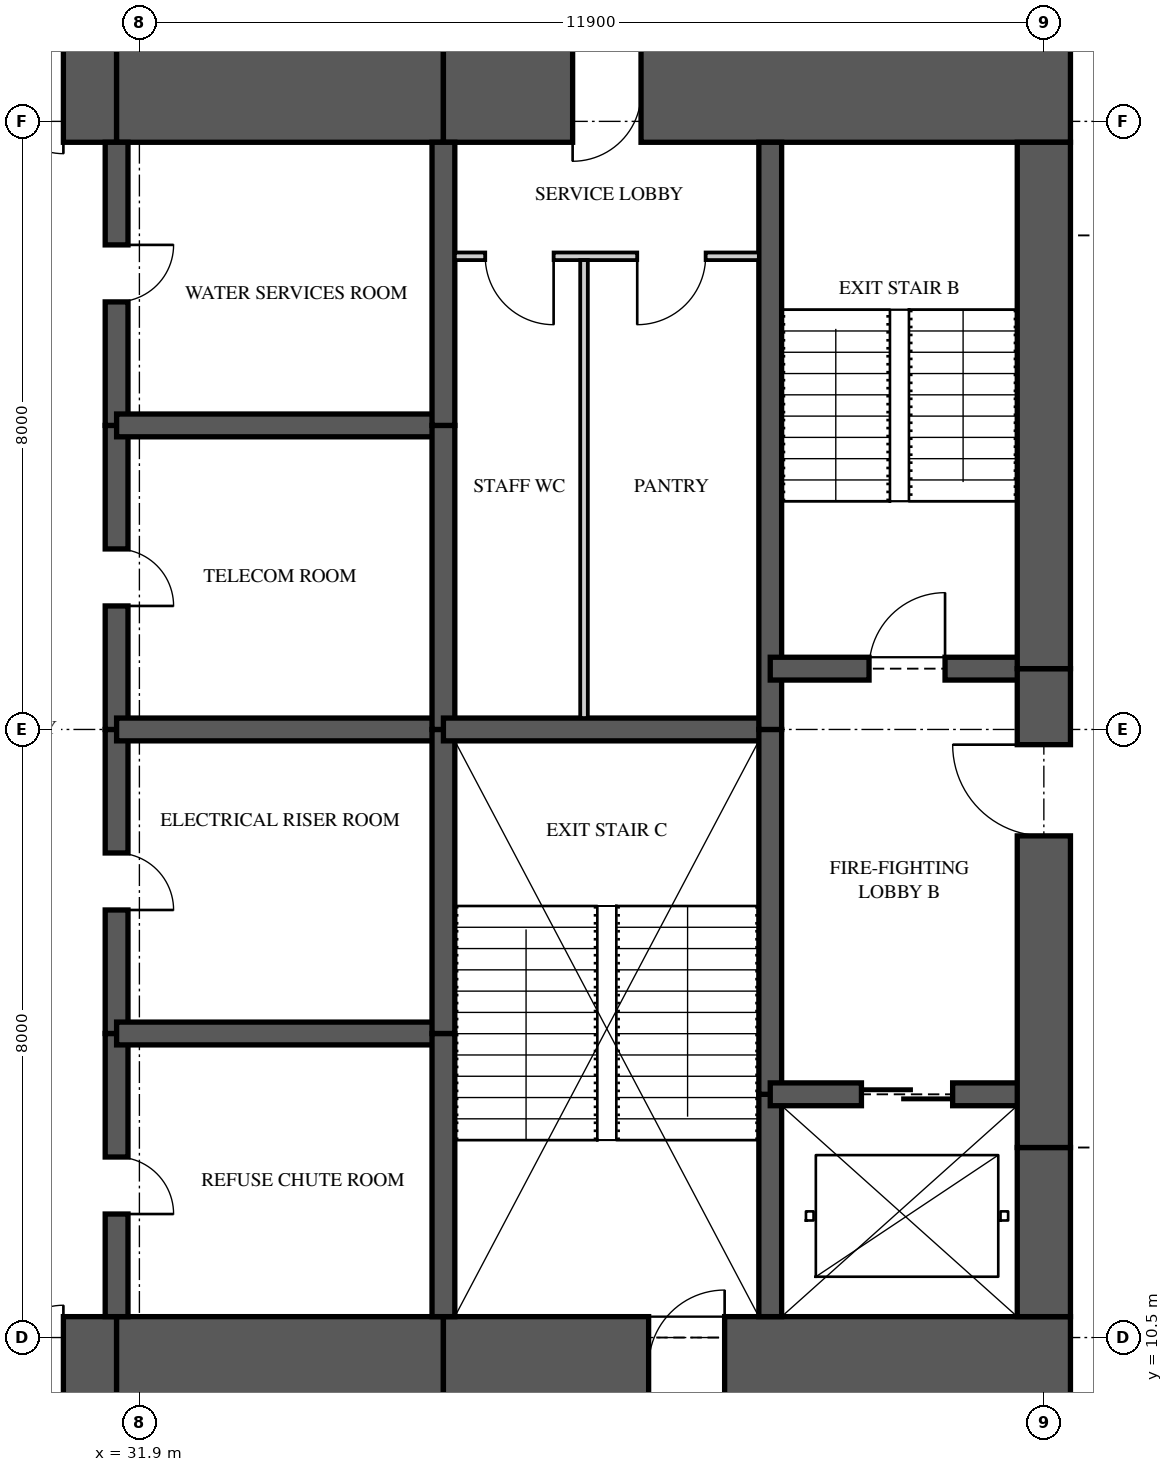
"""IFC4 building model, lengths in metres.
Left out: names, types, materials, properties, quantities, classifications, styles, units other than length and angle.
Written with IfcOpenShell. Run it as: python <this file> out.ifc"""

import sys

from ifc_helpers import new_model, si_unit, direction, frame, frame_2d, origin, place, context, subcontext, project, spatial, rectangle, extrude, element, fill, save


model = new_model("IFC4")
c1 = context("Model", 3, precision=1e-05, world=origin(), true_north=direction((0.0, 1.0)))
c2 = subcontext(c1, "Body", "Model", "MODEL_VIEW")
j1 = project(units=[si_unit("LENGTHUNIT", "METRE"), si_unit("PLANEANGLEUNIT", "RADIAN")], contexts=[c1])
p1 = place(None, origin())
s1 = spatial("IfcSite", under=j1, at=p1, CompositionType="ELEMENT")
p2 = place(p1, origin())
s2 = spatial("IfcBuilding", under=s1, at=p2, CompositionType="ELEMENT")
p3 = place(p2, frame((0.0, 0.0, 194.55)))
s3 = spatial("IfcBuildingStorey", under=s2, at=p3, CompositionType="ELEMENT", Elevation=194.55)
p4 = place(p3, frame((26.0, 10.125, 0.0), z_axis=(0.0, 0.0, 1.0), x_axis=(1.0, 0.0, 0.0)))
e1 = element("IfcWall", 1, at=p4, inside=s3, PredefinedType="SHEAR", context=c2, shape_type="SweptSolid", body=[
    extrude(rectangle(XDim=5.6, YDim=1.3, at=frame_2d((2.8, 0.0))), origin(), (0.0, 0.0, 1.0), 3.35),
])
p5 = place(p4, frame((3.3, 0.0, 0.0)))
e2 = element("IfcOpeningElement", 2, at=p5, cuts=e1, PredefinedType="OPENING", context=c2, shape_type="SweptSolid", body=[
    extrude(rectangle(XDim=1.6, YDim=2.1, at=frame_2d((0.8, 1.05))), frame((0.0, 0.66, 0.0), z_axis=(0.0, -1.0, 0.0), x_axis=(1.0, 0.0, 0.0)), (0.0, 0.0, 1.0), 1.32),
])
p6 = place(p3, frame((31.6, 10.125, 0.0), z_axis=(0.0, 0.0, 1.0), x_axis=(1.0, 0.0, 0.0)))
e3 = element("IfcWall", 3, at=p6, inside=s3, PredefinedType="SHEAR", context=c2, shape_type="SweptSolid", body=[
    extrude(rectangle(XDim=4.3, YDim=1.3, at=frame_2d((2.15, 0.0))), origin(), (0.0, 0.0, 1.0), 3.35),
])
p7 = place(p3, frame((35.9, 10.125, 0.0), z_axis=(0.0, 0.0, 1.0), x_axis=(1.0, 0.0, 0.0)))
e4 = element("IfcWall", 4, at=p7, inside=s3, PredefinedType="SHEAR", context=c2, shape_type="SweptSolid", body=[
    extrude(rectangle(XDim=8.25, YDim=1.3, at=frame_2d((4.125, 0.0))), origin(), (0.0, 0.0, 1.0), 3.35),
])
p8 = place(p7, frame((2.7, 0.0, 0.0)))
e5 = element("IfcOpeningElement", 5, at=p8, cuts=e4, PredefinedType="OPENING", context=c2, shape_type="SweptSolid", body=[
    extrude(rectangle(XDim=1.0, YDim=2.1, at=frame_2d((0.5, 1.05))), frame((0.0, 0.66, 0.0), z_axis=(0.0, -1.0, 0.0), x_axis=(1.0, 0.0, 0.0)), (0.0, 0.0, 1.0), 1.32),
])
p9 = place(p3, frame((44.15, 26.875, 0.0), z_axis=(0.0, 0.0, 1.0), x_axis=(-1.0, 0.0, 0.0)))
e6 = element("IfcWall", 6, at=p9, inside=s3, PredefinedType="SHEAR", context=c2, shape_type="SweptSolid", body=[
    extrude(rectangle(XDim=8.25, YDim=1.3, at=frame_2d((4.125, 0.0))), origin(), (0.0, 0.0, 1.0), 3.35),
])
p10 = place(p9, frame((5.65, 0.0, 0.0)))
e7 = element("IfcOpeningElement", 7, at=p10, cuts=e6, PredefinedType="OPENING", context=c2, shape_type="SweptSolid", body=[
    extrude(rectangle(XDim=0.9, YDim=2.1, at=frame_2d((0.45, 1.05))), frame((0.0, 0.66, 0.0), z_axis=(0.0, -1.0, 0.0), x_axis=(1.0, 0.0, 0.0)), (0.0, 0.0, 1.0), 1.32),
])
p11 = place(p3, frame((35.9, 26.875, 0.0), z_axis=(0.0, 0.0, 1.0), x_axis=(-1.0, 0.0, 0.0)))
e8 = element("IfcWall", 8, at=p11, inside=s3, PredefinedType="SHEAR", context=c2, shape_type="SweptSolid", body=[
    extrude(rectangle(XDim=4.3, YDim=1.3, at=frame_2d((2.15, 0.0))), origin(), (0.0, 0.0, 1.0), 3.35),
])
p12 = place(p3, frame((31.6, 26.875, 0.0), z_axis=(0.0, 0.0, 1.0), x_axis=(-1.0, 0.0, 0.0)))
e9 = element("IfcWall", 9, at=p12, inside=s3, PredefinedType="SHEAR", context=c2, shape_type="SweptSolid", body=[
    extrude(rectangle(XDim=5.6, YDim=1.3, at=frame_2d((2.8, 0.0))), origin(), (0.0, 0.0, 1.0), 3.35),
])
p13 = place(p12, frame((0.7, 0.0, 0.0)))
e10 = element("IfcOpeningElement", 10, at=p13, cuts=e9, PredefinedType="OPENING", context=c2, shape_type="SweptSolid", body=[
    extrude(rectangle(XDim=1.6, YDim=2.1, at=frame_2d((0.8, 1.05))), frame((0.0, 0.66, 0.0), z_axis=(0.0, -1.0, 0.0), x_axis=(1.0, 0.0, 0.0)), (0.0, 0.0, 1.0), 1.32),
])
p14 = place(p3, frame((43.8, 10.775, 0.0), z_axis=(0.0, 0.0, 1.0), x_axis=(0.0, 1.0, 0.0)))
e11 = element("IfcWall", 11, at=p14, inside=s3, PredefinedType="SHEAR", context=c2, shape_type="SweptSolid", body=[
    extrude(rectangle(XDim=2.225, YDim=0.7, at=frame_2d((1.113, 0.0))), origin(), (0.0, 0.0, 1.0), 3.35),
])
p15 = place(p3, frame((43.8, 13.0, 0.0), z_axis=(0.0, 0.0, 1.0), x_axis=(0.0, 1.0, 0.0)))
e12 = element("IfcWall", 12, at=p15, inside=s3, PredefinedType="SHEAR", context=c2, shape_type="SweptSolid", body=[
    extrude(rectangle(XDim=6.3, YDim=0.7, at=frame_2d((3.15, 0.0))), origin(), (0.0, 0.0, 1.0), 3.35),
])
p16 = place(p15, frame((4.1, 0.0, 0.0)))
e13 = element("IfcOpeningElement", 13, at=p16, cuts=e12, PredefinedType="OPENING", context=c2, shape_type="SweptSolid", body=[
    extrude(rectangle(XDim=1.2, YDim=2.2, at=frame_2d((0.6, 1.1))), frame((0.0, 0.36, 0.0), z_axis=(0.0, -1.0, 0.0), x_axis=(1.0, 0.0, 0.0)), (0.0, 0.0, 1.0), 0.72),
])
p17 = place(p3, frame((43.8, 19.3, 0.0), z_axis=(0.0, 0.0, 1.0), x_axis=(0.0, 1.0, 0.0)))
e14 = element("IfcWall", 14, at=p17, inside=s3, PredefinedType="SHEAR", context=c2, shape_type="SweptSolid", body=[
    extrude(rectangle(XDim=6.925, YDim=0.7, at=frame_2d((3.462, 0.0))), origin(), (0.0, 0.0, 1.0), 3.35),
])
p18 = place(p3, frame((31.6, 10.775, 0.0), z_axis=(0.0, 0.0, 1.0), x_axis=(0.0, 1.0, 0.0)))
e15 = element("IfcWall", 15, at=p18, inside=s3, PredefinedType="SHEAR", context=c2, shape_type="SweptSolid", body=[
    extrude(rectangle(XDim=3.725, YDim=0.3, at=frame_2d((1.863, 0.0))), origin(), (0.0, 0.0, 1.0), 3.35),
])
p19 = place(p18, frame((1.35, 0.0, 0.0)))
e16 = element("IfcOpeningElement", 16, at=p19, cuts=e15, PredefinedType="OPENING", context=c2, shape_type="SweptSolid", body=[
    extrude(rectangle(XDim=0.75, YDim=2.1, at=frame_2d((0.375, 1.05))), frame((0.0, 0.16, 0.0), z_axis=(0.0, -1.0, 0.0), x_axis=(1.0, 0.0, 0.0)), (0.0, 0.0, 1.0), 0.32),
])
p20 = place(p3, frame((31.6, 14.5, 0.0), z_axis=(0.0, 0.0, 1.0), x_axis=(0.0, 1.0, 0.0)))
e17 = element("IfcWall", 17, at=p20, inside=s3, PredefinedType="SHEAR", context=c2, shape_type="SweptSolid", body=[
    extrude(rectangle(XDim=4.0, YDim=0.3, at=frame_2d((2.0, 0.0))), origin(), (0.0, 0.0, 1.0), 3.35),
])
p21 = place(p20, frame((1.625, 0.0, 0.0)))
e18 = element("IfcOpeningElement", 18, at=p21, cuts=e17, PredefinedType="OPENING", context=c2, shape_type="SweptSolid", body=[
    extrude(rectangle(XDim=0.75, YDim=2.1, at=frame_2d((0.375, 1.05))), frame((0.0, 0.16, 0.0), z_axis=(0.0, -1.0, 0.0), x_axis=(1.0, 0.0, 0.0)), (0.0, 0.0, 1.0), 0.32),
])
p22 = place(p3, frame((31.6, 18.5, 0.0), z_axis=(0.0, 0.0, 1.0), x_axis=(0.0, 1.0, 0.0)))
e19 = element("IfcWall", 19, at=p22, inside=s3, PredefinedType="SHEAR", context=c2, shape_type="SweptSolid", body=[
    extrude(rectangle(XDim=4.0, YDim=0.3, at=frame_2d((2.0, 0.0))), origin(), (0.0, 0.0, 1.0), 3.35),
])
p23 = place(p22, frame((1.625, 0.0, 0.0)))
e20 = element("IfcOpeningElement", 20, at=p23, cuts=e19, PredefinedType="OPENING", context=c2, shape_type="SweptSolid", body=[
    extrude(rectangle(XDim=0.75, YDim=2.1, at=frame_2d((0.375, 1.05))), frame((0.0, 0.16, 0.0), z_axis=(0.0, -1.0, 0.0), x_axis=(1.0, 0.0, 0.0)), (0.0, 0.0, 1.0), 0.32),
])
p24 = place(p3, frame((31.6, 22.5, 0.0), z_axis=(0.0, 0.0, 1.0), x_axis=(0.0, 1.0, 0.0)))
e21 = element("IfcWall", 21, at=p24, inside=s3, PredefinedType="SHEAR", context=c2, shape_type="SweptSolid", body=[
    extrude(rectangle(XDim=3.725, YDim=0.3, at=frame_2d((1.863, 0.0))), origin(), (0.0, 0.0, 1.0), 3.35),
])
p25 = place(p24, frame((1.625, 0.0, 0.0)))
e22 = element("IfcOpeningElement", 22, at=p25, cuts=e21, PredefinedType="OPENING", context=c2, shape_type="SweptSolid", body=[
    extrude(rectangle(XDim=0.75, YDim=2.1, at=frame_2d((0.375, 1.05))), frame((0.0, 0.16, 0.0), z_axis=(0.0, -1.0, 0.0), x_axis=(1.0, 0.0, 0.0)), (0.0, 0.0, 1.0), 0.32),
])
p26 = place(p3, frame((35.9, 10.775, 0.0), z_axis=(0.0, 0.0, 1.0), x_axis=(0.0, 1.0, 0.0)))
e23 = element("IfcWall", 23, at=p26, inside=s3, PredefinedType="SHEAR", context=c2, shape_type="SweptSolid", body=[
    extrude(rectangle(XDim=3.725, YDim=0.3, at=frame_2d((1.863, 0.0))), origin(), (0.0, 0.0, 1.0), 3.35),
])
for number, where, z_axis, x_axis in (
    (24, (35.9, 14.5, 0.0), (0.0, 0.0, 1.0), (0.0, 1.0, 0.0)),
    (25, (35.9, 18.5, 0.0), (0.0, 0.0, 1.0), (0.0, 1.0, 0.0)),
):
    element("IfcWall", number, at=place(p3, frame(where, z_axis=z_axis, x_axis=x_axis)), inside=s3, PredefinedType="SHEAR", context=c2, shape_type="SweptSolid", body=[
        extrude(rectangle(XDim=4.0, YDim=0.3, at=frame_2d((2.0, 0.0))), origin(), (0.0, 0.0, 1.0), 3.35),
    ])
p27 = place(p3, frame((35.9, 22.5, 0.0), z_axis=(0.0, 0.0, 1.0), x_axis=(0.0, 1.0, 0.0)))
e26 = element("IfcWall", 26, at=p27, inside=s3, PredefinedType="SHEAR", context=c2, shape_type="SweptSolid", body=[
    extrude(rectangle(XDim=3.725, YDim=0.3, at=frame_2d((1.863, 0.0))), origin(), (0.0, 0.0, 1.0), 3.35),
])
p28 = place(p3, frame((40.2, 10.775, 0.0), z_axis=(0.0, 0.0, 1.0), x_axis=(0.0, 1.0, 0.0)))
e27 = element("IfcWall", 27, at=p28, inside=s3, PredefinedType="SHEAR", context=c2, shape_type="SweptSolid", body=[
    extrude(rectangle(XDim=2.925, YDim=0.3, at=frame_2d((1.462, 0.0))), origin(), (0.0, 0.0, 1.0), 3.35),
])
p29 = place(p3, frame((40.2, 13.7, 0.0), z_axis=(0.0, 0.0, 1.0), x_axis=(0.0, 1.0, 0.0)))
e28 = element("IfcWall", 28, at=p29, inside=s3, PredefinedType="SHEAR", context=c2, shape_type="SweptSolid", body=[
    extrude(rectangle(XDim=4.8, YDim=0.3, at=frame_2d((2.4, 0.0))), origin(), (0.0, 0.0, 1.0), 3.35),
])
p30 = place(p3, frame((40.2, 18.5, 0.0), z_axis=(0.0, 0.0, 1.0), x_axis=(0.0, 1.0, 0.0)))
e29 = element("IfcWall", 29, at=p30, inside=s3, PredefinedType="SHEAR", context=c2, shape_type="SweptSolid", body=[
    extrude(rectangle(XDim=7.725, YDim=0.3, at=frame_2d((3.863, 0.0))), origin(), (0.0, 0.0, 1.0), 3.35),
])
for number, where, z_axis, x_axis in (
    (30, (31.6, 14.5, 0.0), (0.0, 0.0, 1.0), (1.0, 0.0, 0.0)),
    (31, (31.6, 18.5, 0.0), (0.0, 0.0, 1.0), (1.0, 0.0, 0.0)),
    (32, (31.6, 22.5, 0.0), (0.0, 0.0, 1.0), (1.0, 0.0, 0.0)),
):
    element("IfcWall", number, at=place(p3, frame(where, z_axis=z_axis, x_axis=x_axis)), inside=s3, PredefinedType="SHEAR", context=c2, shape_type="SweptSolid", body=[
        extrude(rectangle(XDim=4.3, YDim=0.3, at=frame_2d((2.15, 0.0))), origin(), (0.0, 0.0, 1.0), 3.35),
    ])
p31 = place(p3, frame((35.9, 18.5, 0.0), z_axis=(0.0, 0.0, 1.0), x_axis=(1.0, 0.0, 0.0)))
e33 = element("IfcWall", 33, at=p31, inside=s3, PredefinedType="SHEAR", context=c2, shape_type="SweptSolid", body=[
    extrude(rectangle(XDim=4.3, YDim=0.3, at=frame_2d((2.15, 0.0))), origin(), (0.0, 0.0, 1.0), 3.35),
])
p32 = place(p3, frame((40.2, 13.7, 0.0), z_axis=(0.0, 0.0, 1.0), x_axis=(1.0, 0.0, 0.0)))
e34 = element("IfcWall", 34, at=p32, inside=s3, PredefinedType="SHEAR", context=c2, shape_type="SweptSolid", body=[
    extrude(rectangle(XDim=3.6, YDim=0.3, at=frame_2d((1.8, 0.0))), origin(), (0.0, 0.0, 1.0), 3.35),
])
p33 = place(p32, frame((1.2, 0.0, 0.0)))
e35 = element("IfcOpeningElement", 35, at=p33, cuts=e34, PredefinedType="OPENING", context=c2, shape_type="SweptSolid", body=[
    extrude(rectangle(XDim=1.2, YDim=2.1, at=frame_2d((0.6, 1.05))), frame((0.0, 0.16, 0.0), z_axis=(0.0, -1.0, 0.0), x_axis=(1.0, 0.0, 0.0)), (0.0, 0.0, 1.0), 0.32),
])
p34 = place(p3, frame((40.2, 19.3, 0.0), z_axis=(0.0, 0.0, 1.0), x_axis=(1.0, 0.0, 0.0)))
e36 = element("IfcWall", 36, at=p34, inside=s3, PredefinedType="SHEAR", context=c2, shape_type="SweptSolid", body=[
    extrude(rectangle(XDim=3.6, YDim=0.3, at=frame_2d((1.8, 0.0))), origin(), (0.0, 0.0, 1.0), 3.35),
])
p35 = place(p34, frame((1.3, 0.0, 0.0)))
e37 = element("IfcOpeningElement", 37, at=p35, cuts=e36, PredefinedType="OPENING", context=c2, shape_type="SweptSolid", body=[
    extrude(rectangle(XDim=1.0, YDim=2.1, at=frame_2d((0.5, 1.05))), frame((0.0, 0.16, 0.0), z_axis=(0.0, -1.0, 0.0), x_axis=(1.0, 0.0, 0.0)), (0.0, 0.0, 1.0), 0.32),
])
p36 = place(p3, frame((36.05, 24.725, 0.0), z_axis=(0.0, 0.0, 1.0), x_axis=(1.0, 0.0, 0.0)))
e38 = element("IfcWall", 38, at=p36, inside=s3, PredefinedType="PARTITIONING", context=c2, shape_type="SweptSolid", body=[
    extrude(rectangle(XDim=4.0, YDim=0.1, at=frame_2d((2.0, 0.0))), origin(), (0.0, 0.0, 1.0), 3.11),
])
p37 = place(p36, frame((0.4, 0.0, 0.0)))
e39 = element("IfcOpeningElement", 39, at=p37, cuts=e38, PredefinedType="OPENING", context=c2, shape_type="SweptSolid", body=[
    extrude(rectangle(XDim=0.9, YDim=2.1, at=frame_2d((0.45, 1.05))), frame((0.0, 0.06, 0.0), z_axis=(0.0, -1.0, 0.0), x_axis=(1.0, 0.0, 0.0)), (0.0, 0.0, 1.0), 0.12),
])
p38 = place(p36, frame((2.4, 0.0, 0.0)))
e40 = element("IfcOpeningElement", 40, at=p38, cuts=e38, PredefinedType="OPENING", context=c2, shape_type="SweptSolid", body=[
    extrude(rectangle(XDim=0.9, YDim=2.1, at=frame_2d((0.45, 1.05))), frame((0.0, 0.06, 0.0), z_axis=(0.0, -1.0, 0.0), x_axis=(1.0, 0.0, 0.0)), (0.0, 0.0, 1.0), 0.12),
])
p39 = place(p3, frame((37.75, 18.65, 0.0), z_axis=(0.0, 0.0, 1.0), x_axis=(0.0, 1.0, 0.0)))
e41 = element("IfcWall", 41, at=p39, inside=s3, PredefinedType="PARTITIONING", context=c2, shape_type="SweptSolid", body=[
    extrude(rectangle(XDim=6.025, YDim=0.1, at=frame_2d((3.013, 0.0))), origin(), (0.0, 0.0, 1.0), 3.11),
])
p40 = place(p37, frame((0.9, 0.0, 0.0), z_axis=(0.0, 0.0, 1.0), x_axis=(-1.0, 0.0, 0.0)))
e42 = element("IfcDoor", 42, at=p40, inside=s3, OperationType="SINGLE_SWING_LEFT", PredefinedType="DOOR", context=c2, shape_type="SweptSolid", body=[
    extrude(rectangle(XDim=0.9, YDim=2.1, at=frame_2d((0.45, 1.05))), frame((0.0, 0.025, 0.0), z_axis=(0.0, -1.0, 0.0), x_axis=(1.0, 0.0, 0.0)), (0.0, 0.0, 1.0), 0.05),
])
fill(e39, e42)
p41 = place(p38, frame((0.9, 0.0, 0.0), z_axis=(0.0, 0.0, 1.0), x_axis=(-1.0, 0.0, 0.0)))
e43 = element("IfcDoor", 43, at=p41, inside=s3, OperationType="SINGLE_SWING_RIGHT", PredefinedType="DOOR", context=c2, shape_type="SweptSolid", body=[
    extrude(rectangle(XDim=0.9, YDim=2.1, at=frame_2d((0.45, 1.05))), frame((0.0, 0.025, 0.0), z_axis=(0.0, -1.0, 0.0), x_axis=(1.0, 0.0, 0.0)), (0.0, 0.0, 1.0), 0.05),
])
fill(e40, e43)
p42 = place(p35, origin())
e44 = element("IfcDoor", 44, at=p42, inside=s3, OperationType="SINGLE_SWING_RIGHT", PredefinedType="DOOR", context=c2, shape_type="SweptSolid", body=[
    extrude(rectangle(XDim=1.0, YDim=2.1, at=frame_2d((0.5, 1.05))), frame((0.0, 0.025, 0.0), z_axis=(0.0, -1.0, 0.0), x_axis=(1.0, 0.0, 0.0)), (0.0, 0.0, 1.0), 0.05),
])
fill(e37, e44)
p43 = place(p16, origin())
e45 = element("IfcDoor", 45, at=p43, inside=s3, OperationType="SINGLE_SWING_RIGHT", PredefinedType="DOOR", context=c2, shape_type="SweptSolid", body=[
    extrude(rectangle(XDim=1.2, YDim=2.2, at=frame_2d((0.6, 1.1))), frame((0.0, 0.025, 0.0), z_axis=(0.0, -1.0, 0.0), x_axis=(1.0, 0.0, 0.0)), (0.0, 0.0, 1.0), 0.05),
])
fill(e13, e45)
p44 = place(p33, origin())
e46 = element("IfcDoor", 46, at=p44, inside=s3, OperationType="SLIDING_TO_LEFT", PredefinedType="DOOR", context=c2, shape_type="SweptSolid", body=[
    extrude(rectangle(XDim=1.2, YDim=2.1, at=frame_2d((0.6, 1.05))), frame((0.0, 0.025, 0.0), z_axis=(0.0, -1.0, 0.0), x_axis=(1.0, 0.0, 0.0)), (0.0, 0.0, 1.0), 0.05),
])
fill(e35, e46)
p45 = place(p5, origin())
e47 = element("IfcDoor", 47, at=p45, inside=s3, OperationType="DOUBLE_DOOR_SINGLE_SWING", PredefinedType="DOOR", context=c2, shape_type="SweptSolid", body=[
    extrude(rectangle(XDim=1.6, YDim=2.1, at=frame_2d((0.8, 1.05))), frame((0.0, 0.025, 0.0), z_axis=(0.0, -1.0, 0.0), x_axis=(1.0, 0.0, 0.0)), (0.0, 0.0, 1.0), 0.05),
])
fill(e2, e47)
p46 = place(p13, origin())
e48 = element("IfcDoor", 48, at=p46, inside=s3, OperationType="DOUBLE_DOOR_SINGLE_SWING", PredefinedType="DOOR", context=c2, shape_type="SweptSolid", body=[
    extrude(rectangle(XDim=1.6, YDim=2.1, at=frame_2d((0.8, 1.05))), frame((0.0, 0.025, 0.0), z_axis=(0.0, -1.0, 0.0), x_axis=(1.0, 0.0, 0.0)), (0.0, 0.0, 1.0), 0.05),
])
fill(e10, e48)
p47 = place(p19, frame((0.75, 0.0, 0.0), z_axis=(0.0, 0.0, 1.0), x_axis=(-1.0, 0.0, 0.0)))
e49 = element("IfcDoor", 49, at=p47, inside=s3, OperationType="SINGLE_SWING_RIGHT", PredefinedType="DOOR", context=c2, shape_type="SweptSolid", body=[
    extrude(rectangle(XDim=0.75, YDim=2.1, at=frame_2d((0.375, 1.05))), frame((0.0, 0.025, 0.0), z_axis=(0.0, -1.0, 0.0), x_axis=(1.0, 0.0, 0.0)), (0.0, 0.0, 1.0), 0.05),
])
fill(e16, e49)
p48 = place(p21, frame((0.75, 0.0, 0.0), z_axis=(0.0, 0.0, 1.0), x_axis=(-1.0, 0.0, 0.0)))
e50 = element("IfcDoor", 50, at=p48, inside=s3, OperationType="SINGLE_SWING_RIGHT", PredefinedType="DOOR", context=c2, shape_type="SweptSolid", body=[
    extrude(rectangle(XDim=0.75, YDim=2.1, at=frame_2d((0.375, 1.05))), frame((0.0, 0.025, 0.0), z_axis=(0.0, -1.0, 0.0), x_axis=(1.0, 0.0, 0.0)), (0.0, 0.0, 1.0), 0.05),
])
fill(e18, e50)
p49 = place(p23, frame((0.75, 0.0, 0.0), z_axis=(0.0, 0.0, 1.0), x_axis=(-1.0, 0.0, 0.0)))
e51 = element("IfcDoor", 51, at=p49, inside=s3, OperationType="SINGLE_SWING_RIGHT", PredefinedType="DOOR", context=c2, shape_type="SweptSolid", body=[
    extrude(rectangle(XDim=0.75, YDim=2.1, at=frame_2d((0.375, 1.05))), frame((0.0, 0.025, 0.0), z_axis=(0.0, -1.0, 0.0), x_axis=(1.0, 0.0, 0.0)), (0.0, 0.0, 1.0), 0.05),
])
fill(e20, e51)
p50 = place(p25, frame((0.75, 0.0, 0.0), z_axis=(0.0, 0.0, 1.0), x_axis=(-1.0, 0.0, 0.0)))
e52 = element("IfcDoor", 52, at=p50, inside=s3, OperationType="SINGLE_SWING_LEFT", PredefinedType="DOOR", context=c2, shape_type="SweptSolid", body=[
    extrude(rectangle(XDim=0.75, YDim=2.1, at=frame_2d((0.375, 1.05))), frame((0.0, 0.025, 0.0), z_axis=(0.0, -1.0, 0.0), x_axis=(1.0, 0.0, 0.0)), (0.0, 0.0, 1.0), 0.05),
])
fill(e22, e52)
p51 = place(p8, origin())
e53 = element("IfcDoor", 53, at=p51, inside=s3, OperationType="SINGLE_SWING_RIGHT", PredefinedType="DOOR", context=c2, shape_type="SweptSolid", body=[
    extrude(rectangle(XDim=1.0, YDim=2.1, at=frame_2d((0.5, 1.05))), frame((0.0, 0.025, 0.0), z_axis=(0.0, -1.0, 0.0), x_axis=(1.0, 0.0, 0.0)), (0.0, 0.0, 1.0), 0.05),
])
fill(e5, e53)
p52 = place(p10, origin())
e54 = element("IfcDoor", 54, at=p52, inside=s3, OperationType="SINGLE_SWING_RIGHT", PredefinedType="DOOR", context=c2, shape_type="SweptSolid", body=[
    extrude(rectangle(XDim=0.9, YDim=2.1, at=frame_2d((0.45, 1.05))), frame((0.0, 0.47, 0.0), z_axis=(0.0, -1.0, 0.0), x_axis=(1.0, 0.0, 0.0)), (0.0, 0.0, 1.0), 0.8),
])
fill(e7, e54)
save(model, sys.argv[1])
